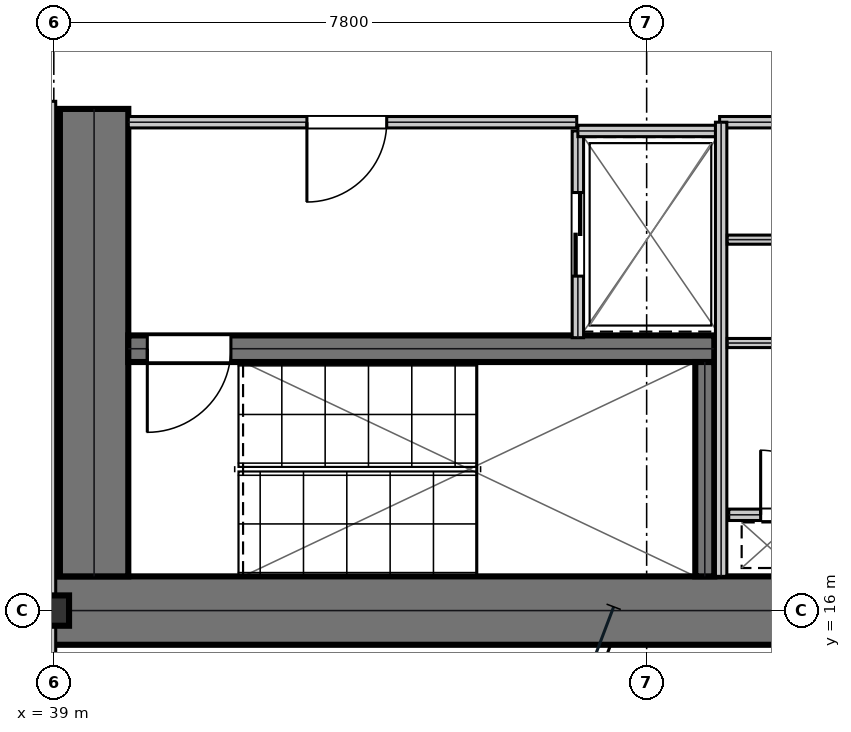
"""IFC4 building model, lengths in metres.
Left out: names, types, materials, properties, quantities, classifications, styles, units other than length and angle.
Written with IfcOpenShell. Run it as: python <this file> out.ifc"""

import sys

from ifc_helpers import new_model, si_unit, direction, frame, frame_2d, origin, origin_2d, place, context, subcontext, project, spatial, rectangle, i_section, extrude, element, fill, save


model = new_model("IFC4")
c1 = context("Model", 3, precision=1e-05, world=origin(), true_north=direction((0.0, 1.0)))
c2 = subcontext(c1, "Body", "Model", "MODEL_VIEW")
j1 = project(units=[si_unit("LENGTHUNIT", "METRE"), si_unit("PLANEANGLEUNIT", "RADIAN")], contexts=[c1])
p1 = place(None, origin())
s1 = spatial("IfcSite", under=j1, at=p1, CompositionType="ELEMENT")
p2 = place(p1, origin())
s2 = spatial("IfcBuilding", under=s1, at=p2, CompositionType="ELEMENT")
p3 = place(p2, frame((0.0, 0.0, 41.85)))
s3 = spatial("IfcBuildingStorey", under=s2, at=p3, CompositionType="ELEMENT", Elevation=41.85)
p4 = place(p3, frame((38.8, 16.0, 0.0), z_axis=(0.0, 0.0, 1.0), x_axis=(1.0, 0.0, 0.0)))
e1 = element("IfcWall", 1, at=p4, inside=s3, PredefinedType="SHEAR", context=c2, shape_type="SweptSolid", body=[
    extrude(rectangle(XDim=16.0, YDim=0.9, at=frame_2d((8.0, 0.0))), origin(), (0.0, 0.0, 1.0), 3.81),
])
p5 = place(p3, frame((39.53, 16.45, 0.0), z_axis=(0.0, 0.0, 1.0), x_axis=(0.0, 1.0, 0.0)))
e2 = element("IfcWall", 2, at=p5, inside=s3, PredefinedType="SHEAR", context=c2, shape_type="SweptSolid", body=[
    extrude(rectangle(XDim=6.15, YDim=0.9, at=frame_2d((3.075, 0.0))), origin(), (0.0, 0.0, 1.0), 3.81),
])
p6 = place(p3, frame((39.98, 19.445, 0.0), z_axis=(0.0, 0.0, 1.0), x_axis=(1.0, 0.0, 0.0)))
e3 = element("IfcWall", 3, at=p6, inside=s3, PredefinedType="SHEAR", context=c2, shape_type="SweptSolid", body=[
    extrude(rectangle(XDim=7.71, YDim=0.35, at=frame_2d((3.855, 0.0))), origin(), (0.0, 0.0, 1.0), 3.81),
])
p7 = place(p6, frame((0.25, 0.0, 0.0)))
e4 = element("IfcOpeningElement", 4, at=p7, cuts=e3, PredefinedType="OPENING", context=c2, shape_type="SweptSolid", body=[
    extrude(rectangle(XDim=1.1, YDim=2.15, at=frame_2d((0.55, 1.075))), frame((0.0, 0.185, 0.0), z_axis=(0.0, -1.0, 0.0), x_axis=(1.0, 0.0, 0.0)), (0.0, 0.0, 1.0), 0.37),
])
p8 = place(p3, frame((47.565, 16.45, 0.0), z_axis=(0.0, 0.0, 1.0), x_axis=(0.0, 1.0, 0.0)))
e5 = element("IfcWall", 5, at=p8, inside=s3, PredefinedType="SHEAR", context=c2, shape_type="SweptSolid", body=[
    extrude(rectangle(XDim=2.82, YDim=0.25, at=frame_2d((1.41, 0.0))), origin(), (0.0, 0.0, 1.0), 3.81),
])
p9 = place(p3, frame((39.0, 16.0, 0.0), z_axis=(0.0, 0.0, 1.0), x_axis=(1.0, 0.0, 0.0)))
e6 = element("IfcColumn", 6, at=p9, inside=s3, PredefinedType="COLUMN", context=c2, shape_type="SweptSolid", body=[
    extrude(i_section(OverallWidth=0.401, OverallDepth=0.399, WebThickness=0.025, FlangeThickness=0.04, at=origin_2d()), origin(), (0.0, 0.0, 1.0), 4.044),
])
p10 = place(p3, frame((39.98, 22.425, 0.0), z_axis=(0.0, 0.0, 1.0), x_axis=(1.0, 0.0, 0.0)))
e7 = element("IfcWall", 7, at=p10, inside=s3, PredefinedType="PARTITIONING", context=c2, shape_type="SweptSolid", body=[
    extrude(rectangle(XDim=5.9, YDim=0.15, at=frame_2d((2.95, 0.0))), origin(), (0.0, 0.0, 1.0), 3.81),
])
p11 = place(p10, frame((2.35, 0.0, 0.0)))
e8 = element("IfcOpeningElement", 8, at=p11, cuts=e7, PredefinedType="OPENING", context=c2, shape_type="SweptSolid", body=[
    extrude(rectangle(XDim=1.05, YDim=2.15, at=frame_2d((0.525, 1.075))), frame((0.0, 0.085, 0.0), z_axis=(0.0, -1.0, 0.0), x_axis=(1.0, 0.0, 0.0)), (0.0, 0.0, 1.0), 0.17),
])
p12 = place(p3, frame((45.895, 19.59, 0.0), z_axis=(0.0, 0.0, 1.0), x_axis=(0.0, 1.0, 0.0)))
e9 = element("IfcWall", 9, at=p12, inside=s3, PredefinedType="PARTITIONING", context=c2, shape_type="SweptSolid", body=[
    extrude(rectangle(XDim=2.72, YDim=0.15, at=frame_2d((1.36, 0.0))), origin(), (0.0, 0.0, 1.0), 3.81),
])
p13 = place(p12, frame((0.81, 0.0, 0.0)))
e10 = element("IfcOpeningElement", 10, at=p13, cuts=e9, PredefinedType="OPENING", context=c2, shape_type="SweptSolid", body=[
    extrude(rectangle(XDim=1.1, YDim=2.15, at=frame_2d((0.55, 1.075))), frame((0.0, 0.085, 0.0), z_axis=(0.0, -1.0, 0.0), x_axis=(1.0, 0.0, 0.0)), (0.0, 0.0, 1.0), 0.17),
])
p14 = place(p3, frame((45.895, 22.31, 0.0), z_axis=(0.0, 0.0, 1.0), x_axis=(1.0, 0.0, 0.0)))
e11 = element("IfcWall", 11, at=p14, inside=s3, PredefinedType="PARTITIONING", context=c2, shape_type="SweptSolid", body=[
    extrude(rectangle(XDim=1.915, YDim=0.15, at=frame_2d((0.958, 0.0))), origin(), (0.0, 0.0, 1.0), 3.81),
])
p15 = place(p3, frame((47.88, 17.26, 0.0), z_axis=(0.0, 0.0, 1.0), x_axis=(1.0, 0.0, 0.0)))
e12 = element("IfcWall", 12, at=p15, inside=s3, PredefinedType="PARTITIONING", context=c2, shape_type="SweptSolid", body=[
    extrude(rectangle(XDim=1.72, YDim=0.15, at=frame_2d((0.86, 0.0))), origin(), (0.0, 0.0, 1.0), 3.81),
])
p16 = place(p15, frame((0.42, 0.0, 0.0)))
e13 = element("IfcOpeningElement", 13, at=p16, cuts=e12, PredefinedType="OPENING", context=c2, shape_type="SweptSolid", body=[
    extrude(rectangle(XDim=0.85, YDim=2.15, at=frame_2d((0.425, 1.075))), frame((0.0, 0.085, 0.0), z_axis=(0.0, -1.0, 0.0), x_axis=(1.0, 0.0, 0.0)), (0.0, 0.0, 1.0), 0.17),
])
p17 = place(p3, frame((47.76, 22.425, 0.0), z_axis=(0.0, 0.0, 1.0), x_axis=(1.0, 0.0, 0.0)))
e14 = element("IfcWall", 14, at=p17, inside=s3, PredefinedType="PARTITIONING", context=c2, shape_type="SweptSolid", body=[
    extrude(rectangle(XDim=1.96, YDim=0.15, at=frame_2d((0.98, 0.0))), origin(), (0.0, 0.0, 1.0), 3.81),
])
p18 = place(p3, frame((47.78, 16.45, 0.0), z_axis=(0.0, 0.0, 1.0), x_axis=(0.0, 1.0, 0.0)))
e15 = element("IfcWall", 15, at=p18, inside=s3, PredefinedType="PARTITIONING", context=c2, shape_type="SweptSolid", body=[
    extrude(rectangle(XDim=5.975, YDim=0.15, at=frame_2d((2.988, 0.0))), origin(), (0.0, 0.0, 1.0), 3.81),
])
for number, where, z_axis, x_axis in (
    (16, (47.86, 19.52, 0.0), (0.0, 0.0, 1.0), (1.0, 0.0, 0.0)),
    (17, (47.86, 20.88, 0.0), (0.0, 0.0, 1.0), (1.0, 0.0, 0.0)),
):
    element("IfcWall", number, at=place(p3, frame(where, z_axis=z_axis, x_axis=x_axis)), inside=s3, PredefinedType="PARTITIONING", context=c2, shape_type="SweptSolid", body=[
        extrude(rectangle(XDim=1.76, YDim=0.12, at=frame_2d((0.88, 0.0))), origin(), (0.0, 0.0, 1.0), 3.81),
    ])
p19 = place(p3, frame((38.95, 14.5, 0.0), z_axis=(0.0, 0.0, 1.0), x_axis=(0.0, 1.0, 0.0)))
e18 = element("IfcWall", 18, at=p19, inside=s3, PredefinedType="PARTITIONING", context=c2, shape_type="SweptSolid", body=[
    extrude(rectangle(XDim=8.2, YDim=0.15, at=frame_2d((4.1, 0.0))), origin(), (0.0, 0.0, 1.0), 3.181),
])
p20 = place(p11, frame((1.05, 0.0, 0.0), z_axis=(0.0, 0.0, 1.0), x_axis=(-1.0, 0.0, 0.0)))
e19 = element("IfcDoor", 19, at=p20, inside=s3, OperationType="SINGLE_SWING_RIGHT", PredefinedType="DOOR", context=c2, shape_type="SweptSolid", body=[
    extrude(rectangle(XDim=1.05, YDim=2.15, at=frame_2d((0.525, 1.075))), frame((0.0, 0.025, 0.0), z_axis=(0.0, -1.0, 0.0), x_axis=(1.0, 0.0, 0.0)), (0.0, 0.0, 1.0), 0.05),
])
fill(e8, e19)
p21 = place(p13, frame((1.1, 0.0, 0.0), z_axis=(0.0, 0.0, 1.0), x_axis=(-1.0, 0.0, 0.0)))
e20 = element("IfcDoor", 20, at=p21, inside=s3, OperationType="DOUBLE_DOOR_SLIDING", PredefinedType="DOOR", context=c2, shape_type="SweptSolid", body=[
    extrude(rectangle(XDim=1.1, YDim=2.15, at=frame_2d((0.55, 1.075))), frame((0.0, 0.025, 0.0), z_axis=(0.0, -1.0, 0.0), x_axis=(1.0, 0.0, 0.0)), (0.0, 0.0, 1.0), 0.05),
])
fill(e10, e20)
p22 = place(p16, origin())
e21 = element("IfcDoor", 21, at=p22, inside=s3, OperationType="SINGLE_SWING_LEFT", PredefinedType="TRAPDOOR", context=c2, shape_type="SweptSolid", body=[
    extrude(rectangle(XDim=0.85, YDim=2.15, at=frame_2d((0.425, 1.075))), frame((0.0, 0.025, 0.0), z_axis=(0.0, -1.0, 0.0), x_axis=(1.0, 0.0, 0.0)), (0.0, 0.0, 1.0), 0.05),
])
fill(e13, e21)
p23 = place(p7, frame((1.1, 0.0, 0.0), z_axis=(0.0, 0.0, 1.0), x_axis=(-1.0, 0.0, 0.0)))
e22 = element("IfcDoor", 22, at=p23, inside=s3, OperationType="SINGLE_SWING_RIGHT", PredefinedType="DOOR", context=c2, shape_type="SweptSolid", body=[
    extrude(rectangle(XDim=1.1, YDim=2.15, at=frame_2d((0.55, 1.075))), frame((0.0, 0.025, 0.0), z_axis=(0.0, -1.0, 0.0), x_axis=(1.0, 0.0, 0.0)), (0.0, 0.0, 1.0), 0.05),
])
fill(e4, e22)
save(model, sys.argv[1])
